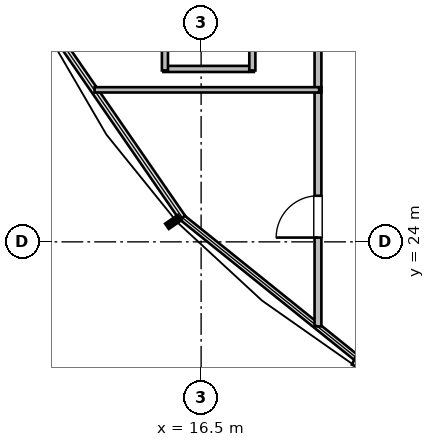
"""IFC4 building model, lengths in metres.
Left out: names, types, materials, properties, quantities, classifications, styles, units other than length and angle.
Written with IfcOpenShell. Run it as: python <this file> out.ifc"""

import sys

from ifc_helpers import new_model, si_unit, direction, frame, frame_2d, origin, place, context, subcontext, project, spatial, rectangle, extrude, element, fill, save


model = new_model("IFC4")
c1 = context("Model", 3, precision=1e-05, world=origin(), true_north=direction((0.0, 1.0)))
c2 = subcontext(c1, "Body", "Model", "MODEL_VIEW")
j1 = project(units=[si_unit("LENGTHUNIT", "METRE"), si_unit("PLANEANGLEUNIT", "RADIAN")], contexts=[c1])
p1 = place(None, origin())
s1 = spatial("IfcSite", under=j1, at=p1, CompositionType="ELEMENT")
p2 = place(p1, origin())
s2 = spatial("IfcBuilding", under=s1, at=p2, CompositionType="ELEMENT")
p3 = place(p2, frame((0.0, 0.0, 145.8)))
s3 = spatial("IfcBuildingStorey", under=s2, at=p3, CompositionType="ELEMENT", Elevation=145.8)
p4 = place(p3, frame((26.994, 17.88, 0.0), z_axis=(0.0, 0.0, 1.0), x_axis=(-0.905106920297, 0.425184034073, 0.0)))
e1 = element("IfcWall", 1, at=p4, inside=s3, PredefinedType="STANDARD", context=c2, shape_type="SweptSolid", body=[
    extrude(rectangle(XDim=7.136, YDim=0.32, at=frame_2d((3.568, 0.0))), origin(), (0.0, 0.0, 1.0), 2.657),
])
for number, where, z_axis, x_axis in (
    (2, (15.508, 28.55, 0.0), (0.0, 0.0, 1.0), (1.0, 0.0, 0.0)),
    (3, (15.548, 28.51, 0.0), (0.0, 0.0, 1.0), (0.0, 1.0, 0.0)),
    (4, (17.848, 28.51, 0.0), (0.0, 0.0, 1.0), (0.0, 1.0, 0.0)),
):
    element("IfcWall", number, at=place(p3, frame(where, z_axis=z_axis, x_axis=x_axis)), inside=s3, PredefinedType="PLUMBINGWALL", context=c2, shape_type="SweptSolid", body=[
        extrude(rectangle(XDim=2.38, YDim=0.16, at=frame_2d((1.19, 0.0))), origin(), (0.0, 0.0, 1.0), 3.36),
    ])
p5 = place(p3, frame((19.575, 21.775, 0.0), z_axis=(0.0, 0.0, 1.0), x_axis=(0.0, 1.0, 0.0)))
e5 = element("IfcWall", 5, at=p5, inside=s3, PredefinedType="PARTITIONING", context=c2, shape_type="SweptSolid", body=[
    extrude(rectangle(XDim=6.29, YDim=0.18, at=frame_2d((3.145, 0.0))), origin(), (0.0, 0.0, 1.0), 3.36),
])
p6 = place(p5, frame((2.338, 0.0, 0.0)))
e6 = element("IfcOpeningElement", 6, at=p6, cuts=e5, PredefinedType="OPENING", context=c2, shape_type="SweptSolid", body=[
    extrude(rectangle(XDim=1.1, YDim=2.1, at=frame_2d((0.55, 1.05))), frame((0.0, 0.1, 0.0), z_axis=(0.0, -1.0, 0.0), x_axis=(1.0, 0.0, 0.0)), (0.0, 0.0, 1.0), 0.2),
])
p7 = place(p3, frame((19.575, 27.935, 0.0), z_axis=(0.0, 0.0, 1.0), x_axis=(0.0, 1.0, 0.0)))
e7 = element("IfcWall", 7, at=p7, inside=s3, PredefinedType="PARTITIONING", context=c2, shape_type="SweptSolid", body=[
    extrude(rectangle(XDim=6.63, YDim=0.18, at=frame_2d((3.315, 0.0))), origin(), (0.0, 0.0, 1.0), 2.657),
])
p8 = place(p7, frame((2.765, 0.0, 0.0)))
e8 = element("IfcOpeningElement", 8, at=p8, cuts=e7, PredefinedType="OPENING", context=c2, shape_type="SweptSolid", body=[
    extrude(rectangle(XDim=1.1, YDim=2.1, at=frame_2d((0.55, 1.05))), frame((0.0, 0.1, 0.0), z_axis=(0.0, -1.0, 0.0), x_axis=(1.0, 0.0, 0.0)), (0.0, 0.0, 1.0), 0.2),
])
p9 = place(p3, frame((13.696, 28.0, 0.0), z_axis=(0.0, 0.0, 1.0), x_axis=(1.0, 0.0, 0.0)))
e9 = element("IfcWall", 9, at=p9, inside=s3, PredefinedType="PARTITIONING", context=c2, shape_type="SweptSolid", body=[
    extrude(rectangle(XDim=5.909, YDim=0.14, at=frame_2d((2.954, 0.0))), origin(), (0.0, 0.0, 1.0), 3.36),
])
p10 = place(p6, origin())
e10 = element("IfcDoor", 10, at=p10, inside=s3, OperationType="SINGLE_SWING_LEFT", PredefinedType="DOOR", context=c2, shape_type="SweptSolid", body=[
    extrude(rectangle(XDim=1.1, YDim=2.1, at=frame_2d((0.55, 1.05))), frame((0.0, 0.025, 0.0), z_axis=(0.0, -1.0, 0.0), x_axis=(1.0, 0.0, 0.0)), (0.0, 0.0, 1.0), 0.05),
])
fill(e6, e10)
save(model, sys.argv[1])
